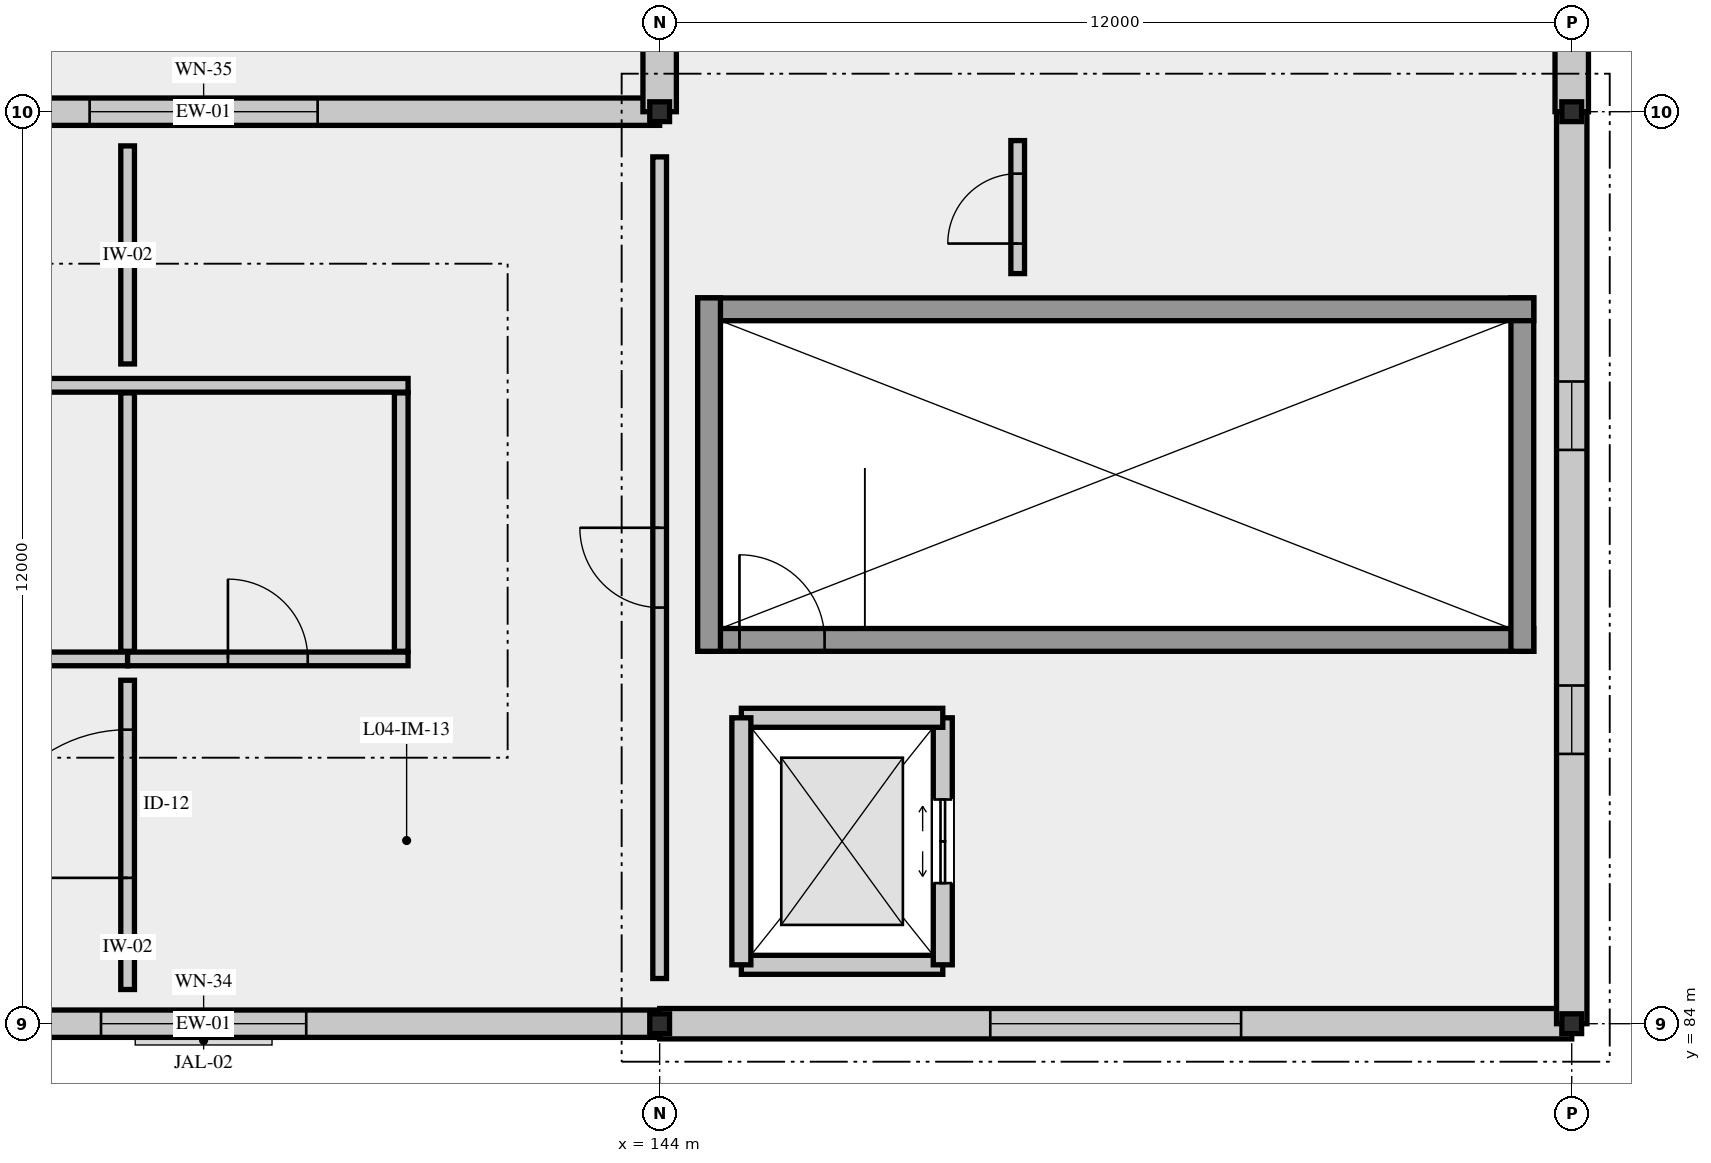
"""IFC4 building model, lengths in metres.
Left out: names, types, materials, properties, quantities, classifications, styles, units other than length and angle.
Written with IfcOpenShell. Run it as: python <this file> out.ifc"""

import sys

from ifc_helpers import new_model, si_unit, direction, frame, frame_2d, origin, origin_2d, place, context, subcontext, project, spatial, rectangle, i_section, extrude, element, fill, save


model = new_model("IFC4")
c1 = context("Model", 3, precision=1e-05, world=origin(), true_north=direction((0.0, 1.0)))
c2 = subcontext(c1, "Body", "Model", "MODEL_VIEW")
j1 = project(units=[si_unit("LENGTHUNIT", "METRE"), si_unit("PLANEANGLEUNIT", "RADIAN")], contexts=[c1])
p1 = place(None, origin())
s1 = spatial("IfcSite", under=j1, at=p1, CompositionType="ELEMENT")
p2 = place(p1, origin())
s2 = spatial("IfcBuilding", under=s1, at=p2, CompositionType="ELEMENT")
p3 = place(p2, frame((0.0, 0.0, 23.4)))
s3 = spatial("IfcBuildingStorey", under=s2, at=p3, CompositionType="ELEMENT", Elevation=23.4)
for number, where, z_axis, x_axis in (
    (1, (144.0, 84.0, 0.0), (0.0, 0.0, 1.0), (1.0, 0.0, 0.0)),
    (2, (144.0, 96.0, 0.0), (0.0, 0.0, 1.0), (1.0, 0.0, 0.0)),
    (3, (156.0, 84.0, 0.0), (0.0, 0.0, 1.0), (1.0, 0.0, 0.0)),
    (4, (156.0, 96.0, 0.0), (0.0, 0.0, 1.0), (1.0, 0.0, 0.0)),
):
    element("IfcColumn", number, at=place(p3, frame(where, z_axis=z_axis, x_axis=x_axis)), inside=s3, PredefinedType="COLUMN", context=c2, shape_type="SweptSolid", body=[
        extrude(i_section(OverallWidth=0.26, OverallDepth=0.26, WebThickness=0.01, FlangeThickness=0.018, FilletRadius=0.024, at=origin_2d()), origin(), (0.0, 0.0, 1.0), 4.8),
    ])
p4 = place(p3, frame((132.0, 84.0, 0.0), z_axis=(0.0, 0.0, 1.0), x_axis=(1.0, 0.0, 0.0)))
e5 = element("IfcWall", 5, at=p4, inside=s3, PredefinedType="SOLIDWALL", context=c2, shape_type="SweptSolid", body=[
    extrude(rectangle(XDim=12.0, YDim=0.36, at=frame_2d((6.0, 0.0))), origin(), (0.0, 0.0, 1.0), 3.98),
])
p5 = place(p4, frame((4.65, 0.0, 0.95)))
e6 = element("IfcOpeningElement", 6, at=p5, cuts=e5, PredefinedType="OPENING", context=c2, shape_type="SweptSolid", body=[
    extrude(rectangle(XDim=2.7, YDim=2.1, at=frame_2d((1.35, 1.05))), frame((0.0, 0.19, 0.0), z_axis=(0.0, -1.0, 0.0), x_axis=(1.0, 0.0, 0.0)), (0.0, 0.0, 1.0), 0.38),
])
p6 = place(p3, frame((144.0, 96.0, 0.0), z_axis=(0.0, 0.0, 1.0), x_axis=(-1.0, 0.0, 0.0)))
e7 = element("IfcWall", 7, at=p6, inside=s3, PredefinedType="SOLIDWALL", context=c2, shape_type="SweptSolid", body=[
    extrude(rectangle(XDim=12.0, YDim=0.36, at=frame_2d((6.0, 0.0))), origin(), (0.0, 0.0, 1.0), 3.98),
])
p7 = place(p6, frame((4.5, 0.0, 0.95)))
e8 = element("IfcOpeningElement", 8, at=p7, cuts=e7, PredefinedType="OPENING", context=c2, shape_type="SweptSolid", body=[
    extrude(rectangle(XDim=3.0, YDim=2.1, at=frame_2d((1.5, 1.05))), frame((0.0, 0.19, 0.0), z_axis=(0.0, -1.0, 0.0), x_axis=(1.0, 0.0, 0.0)), (0.0, 0.0, 1.0), 0.38),
])
p8 = place(p3, frame((144.0, 84.0, 0.0), z_axis=(0.0, 0.0, 1.0), x_axis=(1.0, 0.0, 0.0)))
e9 = element("IfcWall", 9, at=p8, inside=s3, PredefinedType="SOLIDWALL", context=c2, shape_type="SweptSolid", body=[
    extrude(rectangle(XDim=12.0, YDim=0.4, at=frame_2d((6.0, 0.0))), origin(), (0.0, 0.0, 1.0), 3.98),
])
p9 = place(p8, frame((4.35, 0.0, 0.95)))
e10 = element("IfcOpeningElement", 10, at=p9, cuts=e9, PredefinedType="OPENING", context=c2, shape_type="SweptSolid", body=[
    extrude(rectangle(XDim=3.3, YDim=2.1, at=frame_2d((1.65, 1.05))), frame((0.0, 0.21, 0.0), z_axis=(0.0, -1.0, 0.0), x_axis=(1.0, 0.0, 0.0)), (0.0, 0.0, 1.0), 0.42),
])
p10 = place(p3, frame((156.0, 84.0, 0.0), z_axis=(0.0, 0.0, 1.0), x_axis=(0.0, 1.0, 0.0)))
e11 = element("IfcWall", 11, at=p10, inside=s3, PredefinedType="SOLIDWALL", context=c2, shape_type="SweptSolid", body=[
    extrude(rectangle(XDim=12.0, YDim=0.4, at=frame_2d((6.0, 0.0))), origin(), (0.0, 0.0, 1.0), 3.98),
])
p11 = place(p10, frame((3.55, 0.0, 0.95)))
e12 = element("IfcOpeningElement", 12, at=p11, cuts=e11, PredefinedType="OPENING", context=c2, shape_type="SweptSolid", body=[
    extrude(rectangle(XDim=0.9, YDim=2.4, at=frame_2d((0.45, 1.2))), frame((0.0, 0.21, 0.0), z_axis=(0.0, -1.0, 0.0), x_axis=(1.0, 0.0, 0.0)), (0.0, 0.0, 1.0), 0.42),
])
p12 = place(p10, frame((7.55, 0.0, 0.95)))
e13 = element("IfcOpeningElement", 13, at=p12, cuts=e11, PredefinedType="OPENING", context=c2, shape_type="SweptSolid", body=[
    extrude(rectangle(XDim=0.9, YDim=2.4, at=frame_2d((0.45, 1.2))), frame((0.0, 0.21, 0.0), z_axis=(0.0, -1.0, 0.0), x_axis=(1.0, 0.0, 0.0)), (0.0, 0.0, 1.0), 0.42),
])
p13 = place(p3, frame((144.0, 108.0, 0.0), z_axis=(0.0, 0.0, 1.0), x_axis=(0.0, -1.0, 0.0)))
e14 = element("IfcWall", 14, at=p13, inside=s3, PredefinedType="SOLIDWALL", context=c2, shape_type="SweptSolid", body=[
    extrude(rectangle(XDim=12.0, YDim=0.44, at=frame_2d((6.0, 0.0))), origin(), (0.0, 0.0, 1.0), 3.98),
])
p14 = place(p13, frame((3.4, 0.0, 0.95)))
e15 = element("IfcOpeningElement", 15, at=p14, cuts=e14, PredefinedType="OPENING", context=c2, shape_type="SweptSolid", body=[
    extrude(rectangle(XDim=1.2, YDim=2.4, at=frame_2d((0.6, 1.2))), frame((0.0, 0.23, 0.0), z_axis=(0.0, -1.0, 0.0), x_axis=(1.0, 0.0, 0.0)), (0.0, 0.0, 1.0), 0.46),
])
p15 = place(p13, frame((7.4, 0.0, 0.95)))
e16 = element("IfcOpeningElement", 16, at=p15, cuts=e14, PredefinedType="OPENING", context=c2, shape_type="SweptSolid", body=[
    extrude(rectangle(XDim=1.2, YDim=2.4, at=frame_2d((0.6, 1.2))), frame((0.0, 0.23, 0.0), z_axis=(0.0, -1.0, 0.0), x_axis=(1.0, 0.0, 0.0)), (0.0, 0.0, 1.0), 0.46),
])
p16 = place(p3, frame((156.0, 96.0, 0.0), z_axis=(0.0, 0.0, 1.0), x_axis=(0.0, 1.0, 0.0)))
e17 = element("IfcWall", 17, at=p16, inside=s3, PredefinedType="SOLIDWALL", context=c2, shape_type="SweptSolid", body=[
    extrude(rectangle(XDim=12.0, YDim=0.44, at=frame_2d((6.0, 0.0))), origin(), (0.0, 0.0, 1.0), 3.98),
])
p17 = place(p16, frame((3.325, 0.0, 0.95)))
e18 = element("IfcOpeningElement", 18, at=p17, cuts=e17, PredefinedType="OPENING", context=c2, shape_type="SweptSolid", body=[
    extrude(rectangle(XDim=1.35, YDim=2.4, at=frame_2d((0.675, 1.2))), frame((0.0, 0.23, 0.0), z_axis=(0.0, -1.0, 0.0), x_axis=(1.0, 0.0, 0.0)), (0.0, 0.0, 1.0), 0.46),
])
p18 = place(p16, frame((7.325, 0.0, 0.95)))
e19 = element("IfcOpeningElement", 19, at=p18, cuts=e17, PredefinedType="OPENING", context=c2, shape_type="SweptSolid", body=[
    extrude(rectangle(XDim=1.35, YDim=2.4, at=frame_2d((0.675, 1.2))), frame((0.0, 0.23, 0.0), z_axis=(0.0, -1.0, 0.0), x_axis=(1.0, 0.0, 0.0)), (0.0, 0.0, 1.0), 0.46),
])
p19 = place(p3, frame((144.5, 89.05, 0.0), z_axis=(0.0, 0.0, 1.0), x_axis=(1.0, 0.0, 0.0)))
e20 = element("IfcWall", 20, at=p19, inside=s3, PredefinedType="SHEAR", context=c2, shape_type="SweptSolid", body=[
    extrude(rectangle(XDim=11.0, YDim=0.3, at=frame_2d((5.5, 0.0))), origin(), (0.0, 0.0, 1.0), 4.56),
])
p20 = place(p19, frame((0.55, 0.0, 0.0)))
e21 = element("IfcOpeningElement", 21, at=p20, cuts=e20, PredefinedType="OPENING", context=c2, shape_type="SweptSolid", body=[
    extrude(rectangle(XDim=1.12, YDim=2.2, at=frame_2d((0.56, 1.1))), frame((0.0, 0.16, 0.0), z_axis=(0.0, -1.0, 0.0), x_axis=(1.0, 0.0, 0.0)), (0.0, 0.0, 1.0), 0.32),
])
p21 = place(p3, frame((155.35, 88.9, 0.0), z_axis=(0.0, 0.0, 1.0), x_axis=(0.0, 1.0, 0.0)))
e22 = element("IfcWall", 22, at=p21, inside=s3, PredefinedType="SHEAR", context=c2, shape_type="SweptSolid", body=[
    extrude(rectangle(XDim=4.65, YDim=0.3, at=frame_2d((2.325, 0.0))), origin(), (0.0, 0.0, 1.0), 4.56),
])
p22 = place(p3, frame((155.5, 93.4, 0.0), z_axis=(0.0, 0.0, 1.0), x_axis=(-1.0, 0.0, 0.0)))
e23 = element("IfcWall", 23, at=p22, inside=s3, PredefinedType="SHEAR", context=c2, shape_type="SweptSolid", body=[
    extrude(rectangle(XDim=11.0, YDim=0.3, at=frame_2d((5.5, 0.0))), origin(), (0.0, 0.0, 1.0), 4.56),
])
p23 = place(p3, frame((144.65, 93.55, 0.0), z_axis=(0.0, 0.0, 1.0), x_axis=(0.0, -1.0, 0.0)))
e24 = element("IfcWall", 24, at=p23, inside=s3, PredefinedType="SHEAR", context=c2, shape_type="SweptSolid", body=[
    extrude(rectangle(XDim=4.65, YDim=0.3, at=frame_2d((2.325, 0.0))), origin(), (0.0, 0.0, 1.0), 4.56),
])
p24 = place(p3, frame((145.075, 84.775, 0.0), z_axis=(0.0, 0.0, 1.0), x_axis=(1.0, 0.0, 0.0)))
e25 = element("IfcWall", 25, at=p24, inside=s3, PredefinedType="SOLIDWALL", context=c2, shape_type="SweptSolid", body=[
    extrude(rectangle(XDim=2.65, YDim=0.25, at=frame_2d((1.325, 0.0))), origin(), (0.0, 0.0, 1.0), 4.54),
])
p25 = place(p3, frame((147.725, 84.775, 0.0), z_axis=(0.0, 0.0, 1.0), x_axis=(0.0, 1.0, 0.0)))
e26 = element("IfcWall", 26, at=p25, inside=s3, PredefinedType="SOLIDWALL", context=c2, shape_type="SweptSolid", body=[
    extrude(rectangle(XDim=3.25, YDim=0.25, at=frame_2d((1.625, 0.0))), origin(), (0.0, 0.0, 1.0), 4.54),
])
p26 = place(p25, frame((1.075, 0.0, 0.0)))
e27 = element("IfcOpeningElement", 27, at=p26, cuts=e26, PredefinedType="OPENING", context=c2, shape_type="SweptSolid", body=[
    extrude(rectangle(XDim=1.1, YDim=2.2, at=frame_2d((0.55, 1.1))), frame((0.0, 0.135, 0.0), z_axis=(0.0, -1.0, 0.0), x_axis=(1.0, 0.0, 0.0)), (0.0, 0.0, 1.0), 0.27),
])
p27 = place(p3, frame((147.725, 88.025, 0.0), z_axis=(0.0, 0.0, 1.0), x_axis=(-1.0, 0.0, 0.0)))
e28 = element("IfcWall", 28, at=p27, inside=s3, PredefinedType="SOLIDWALL", context=c2, shape_type="SweptSolid", body=[
    extrude(rectangle(XDim=2.65, YDim=0.25, at=frame_2d((1.325, 0.0))), origin(), (0.0, 0.0, 1.0), 4.54),
])
p28 = place(p3, frame((145.075, 88.025, 0.0), z_axis=(0.0, 0.0, 1.0), x_axis=(0.0, -1.0, 0.0)))
e29 = element("IfcWall", 29, at=p28, inside=s3, PredefinedType="SOLIDWALL", context=c2, shape_type="SweptSolid", body=[
    extrude(rectangle(XDim=3.25, YDim=0.25, at=frame_2d((1.625, 0.0))), origin(), (0.0, 0.0, 1.0), 4.54),
])
p29 = place(p3, frame((133.31, 92.4, 0.0), z_axis=(0.0, 0.0, 1.0), x_axis=(1.0, 0.0, 0.0)))
e30 = element("IfcWall", 30, at=p29, inside=s3, PredefinedType="PARTITIONING", context=c2, shape_type="SweptSolid", body=[
    extrude(rectangle(XDim=7.38, YDim=0.18, at=frame_2d((3.69, 0.0))), origin(), (0.0, 0.0, 1.0), 4.14),
])
p30 = place(p3, frame((133.31, 88.8, 0.0), z_axis=(0.0, 0.0, 1.0), x_axis=(1.0, 0.0, 0.0)))
e31 = element("IfcWall", 31, at=p30, inside=s3, PredefinedType="PARTITIONING", context=c2, shape_type="SweptSolid", body=[
    extrude(rectangle(XDim=3.69, YDim=0.18, at=frame_2d((1.845, 0.0))), origin(), (0.0, 0.0, 1.0), 4.14),
])
p31 = place(p30, frame((1.365, 0.0, 0.0)))
e32 = element("IfcOpeningElement", 32, at=p31, cuts=e31, PredefinedType="OPENING", context=c2, shape_type="SweptSolid", body=[
    extrude(rectangle(XDim=0.96, YDim=2.15, at=frame_2d((0.48, 1.075))), frame((0.0, 0.1, 0.0), z_axis=(0.0, -1.0, 0.0), x_axis=(1.0, 0.0, 0.0)), (0.0, 0.0, 1.0), 0.2),
])
p32 = place(p3, frame((137.0, 88.8, 0.0), z_axis=(0.0, 0.0, 1.0), x_axis=(1.0, 0.0, 0.0)))
e33 = element("IfcWall", 33, at=p32, inside=s3, PredefinedType="PARTITIONING", context=c2, shape_type="SweptSolid", body=[
    extrude(rectangle(XDim=3.69, YDim=0.18, at=frame_2d((1.845, 0.0))), origin(), (0.0, 0.0, 1.0), 4.14),
])
p33 = place(p32, frame((1.32, 0.0, 0.0)))
e34 = element("IfcOpeningElement", 34, at=p33, cuts=e33, PredefinedType="OPENING", context=c2, shape_type="SweptSolid", body=[
    extrude(rectangle(XDim=1.05, YDim=2.2, at=frame_2d((0.525, 1.1))), frame((0.0, 0.1, 0.0), z_axis=(0.0, -1.0, 0.0), x_axis=(1.0, 0.0, 0.0)), (0.0, 0.0, 1.0), 0.2),
])
for number, where, z_axis, x_axis in (
    (35, (140.6, 88.9, 0.0), (0.0, 0.0, 1.0), (0.0, 1.0, 0.0)),
    (36, (137.0, 88.9, 0.0), (0.0, 0.0, 1.0), (0.0, 1.0, 0.0)),
):
    element("IfcWall", number, at=place(p3, frame(where, z_axis=z_axis, x_axis=x_axis)), inside=s3, PredefinedType="PARTITIONING", context=c2, shape_type="SweptSolid", body=[
        extrude(rectangle(XDim=3.4, YDim=0.18, at=frame_2d((1.7, 0.0))), origin(), (0.0, 0.0, 1.0), 4.14),
    ])
p34 = place(p3, frame((137.0, 84.45, 0.0), z_axis=(0.0, 0.0, 1.0), x_axis=(0.0, 1.0, 0.0)))
e37 = element("IfcWall", 37, at=p34, inside=s3, PredefinedType="PARTITIONING", context=c2, shape_type="SweptSolid", body=[
    extrude(rectangle(XDim=4.069, YDim=0.18, at=frame_2d((2.035, 0.0))), origin(), (0.0, 0.0, 1.0), 4.14),
])
p35 = place(p34, frame((1.469, 0.0, 0.0)))
e38 = element("IfcOpeningElement", 38, at=p35, cuts=e37, PredefinedType="OPENING", context=c2, shape_type="SweptSolid", body=[
    extrude(rectangle(XDim=1.95, YDim=2.45, at=frame_2d((0.975, 1.225))), frame((0.0, 0.1, 0.0), z_axis=(0.0, -1.0, 0.0), x_axis=(1.0, 0.0, 0.0)), (0.0, 0.0, 1.0), 0.2),
])
p36 = place(p3, frame((137.0, 92.681, 0.0), z_axis=(0.0, 0.0, 1.0), x_axis=(0.0, 1.0, 0.0)))
e39 = element("IfcWall", 39, at=p36, inside=s3, PredefinedType="PARTITIONING", context=c2, shape_type="SweptSolid", body=[
    extrude(rectangle(XDim=2.869, YDim=0.18, at=frame_2d((1.435, 0.0))), origin(), (0.0, 0.0, 1.0), 4.14),
])
p37 = place(p3, frame((144.0, 84.594, 0.0), z_axis=(0.0, 0.0, 1.0), x_axis=(0.0, 1.0, 0.0)))
e40 = element("IfcWall", 40, at=p37, inside=s3, PredefinedType="PARTITIONING", context=c2, shape_type="SweptSolid", body=[
    extrude(rectangle(XDim=10.811, YDim=0.18, at=frame_2d((5.406, 0.0))), origin(), (0.0, 0.0, 1.0), 4.15),
])
p38 = place(p37, frame((4.881, 0.0, 0.0)))
e41 = element("IfcOpeningElement", 41, at=p38, cuts=e40, PredefinedType="OPENING", context=c2, shape_type="SweptSolid", body=[
    extrude(rectangle(XDim=1.05, YDim=2.2, at=frame_2d((0.525, 1.1))), frame((0.0, 0.1, 0.0), z_axis=(0.0, -1.0, 0.0), x_axis=(1.0, 0.0, 0.0)), (0.0, 0.0, 1.0), 0.2),
])
p39 = place(p3, frame((148.711, 93.87, 0.0), z_axis=(0.0, 0.0, 1.0), x_axis=(0.0, 1.0, 0.0)))
e42 = element("IfcWall", 42, at=p39, inside=s3, PredefinedType="PARTITIONING", context=c2, shape_type="SweptSolid", body=[
    extrude(rectangle(XDim=1.75, YDim=0.18, at=frame_2d((0.875, 0.0))), origin(), (0.0, 0.0, 1.0), 4.54),
])
p40 = place(p39, frame((0.395, 0.0, 0.0)))
e43 = element("IfcOpeningElement", 43, at=p40, cuts=e42, PredefinedType="OPENING", context=c2, shape_type="SweptSolid", body=[
    extrude(rectangle(XDim=0.92, YDim=2.15, at=frame_2d((0.46, 1.075))), frame((0.0, 0.1, 0.0), z_axis=(0.0, -1.0, 0.0), x_axis=(1.0, 0.0, 0.0)), (0.0, 0.0, 1.0), 0.2),
])
p41 = place(p5, origin())
e44 = element("IfcWindow", 44, at=p41, inside=s3, PartitioningType="SINGLE_PANEL", PredefinedType="WINDOW", context=c2, shape_type="SweptSolid", body=[
    extrude(rectangle(XDim=2.7, YDim=2.1, at=frame_2d((1.35, 1.05))), frame((0.0, 0.03, 0.0), z_axis=(0.0, -1.0, 0.0), x_axis=(1.0, 0.0, 0.0)), (0.0, 0.0, 1.0), 0.06),
])
fill(e6, e44)
p42 = place(p7, origin())
e45 = element("IfcWindow", 45, at=p42, inside=s3, PartitioningType="SINGLE_PANEL", PredefinedType="WINDOW", context=c2, shape_type="SweptSolid", body=[
    extrude(rectangle(XDim=3.0, YDim=2.1, at=frame_2d((1.5, 1.05))), frame((0.0, 0.03, 0.0), z_axis=(0.0, -1.0, 0.0), x_axis=(1.0, 0.0, 0.0)), (0.0, 0.0, 1.0), 0.06),
])
fill(e8, e45)
p43 = place(p9, origin())
e46 = element("IfcWindow", 46, at=p43, inside=s3, PartitioningType="SINGLE_PANEL", PredefinedType="WINDOW", context=c2, shape_type="SweptSolid", body=[
    extrude(rectangle(XDim=3.3, YDim=2.1, at=frame_2d((1.65, 1.05))), frame((0.0, 0.03, 0.0), z_axis=(0.0, -1.0, 0.0), x_axis=(1.0, 0.0, 0.0)), (0.0, 0.0, 1.0), 0.06),
])
fill(e10, e46)
p44 = place(p11, origin())
e47 = element("IfcWindow", 47, at=p44, inside=s3, PartitioningType="SINGLE_PANEL", PredefinedType="WINDOW", context=c2, shape_type="SweptSolid", body=[
    extrude(rectangle(XDim=0.9, YDim=2.4, at=frame_2d((0.45, 1.2))), frame((0.0, 0.03, 0.0), z_axis=(0.0, -1.0, 0.0), x_axis=(1.0, 0.0, 0.0)), (0.0, 0.0, 1.0), 0.06),
])
fill(e12, e47)
p45 = place(p12, origin())
e48 = element("IfcWindow", 48, at=p45, inside=s3, PartitioningType="SINGLE_PANEL", PredefinedType="WINDOW", context=c2, shape_type="SweptSolid", body=[
    extrude(rectangle(XDim=0.9, YDim=2.4, at=frame_2d((0.45, 1.2))), frame((0.0, 0.03, 0.0), z_axis=(0.0, -1.0, 0.0), x_axis=(1.0, 0.0, 0.0)), (0.0, 0.0, 1.0), 0.06),
])
fill(e13, e48)
p46 = place(p20, origin())
e49 = element("IfcDoor", 49, at=p46, inside=s3, OperationType="SINGLE_SWING_LEFT", PredefinedType="DOOR", context=c2, shape_type="SweptSolid", body=[
    extrude(rectangle(XDim=1.12, YDim=2.2, at=frame_2d((0.56, 1.1))), frame((0.0, 0.025, 0.0), z_axis=(0.0, -1.0, 0.0), x_axis=(1.0, 0.0, 0.0)), (0.0, 0.0, 1.0), 0.05),
])
fill(e21, e49)
p47 = place(p26, origin())
e50 = element("IfcDoor", 50, at=p47, inside=s3, OperationType="SLIDING_TO_LEFT", PredefinedType="DOOR", context=c2, shape_type="SweptSolid", body=[
    extrude(rectangle(XDim=1.1, YDim=2.2, at=frame_2d((0.55, 1.1))), frame((0.0, 0.025, 0.0), z_axis=(0.0, -1.0, 0.0), x_axis=(1.0, 0.0, 0.0)), (0.0, 0.0, 1.0), 0.05),
])
fill(e27, e50)
p48 = place(p33, origin())
e51 = element("IfcDoor", 51, at=p48, inside=s3, OperationType="SINGLE_SWING_LEFT", PredefinedType="DOOR", context=c2, shape_type="SweptSolid", body=[
    extrude(rectangle(XDim=1.05, YDim=2.2, at=frame_2d((0.525, 1.1))), frame((0.0, 0.025, 0.0), z_axis=(0.0, -1.0, 0.0), x_axis=(1.0, 0.0, 0.0)), (0.0, 0.0, 1.0), 0.05),
])
fill(e34, e51)
p49 = place(p35, origin())
e52 = element("IfcDoor", 52, at=p49, inside=s3, OperationType="DOUBLE_DOOR_SINGLE_SWING", PredefinedType="DOOR", context=c2, shape_type="SweptSolid", body=[
    extrude(rectangle(XDim=1.95, YDim=2.45, at=frame_2d((0.975, 1.225))), frame((0.0, 0.025, 0.0), z_axis=(0.0, -1.0, 0.0), x_axis=(1.0, 0.0, 0.0)), (0.0, 0.0, 1.0), 0.05),
])
fill(e38, e52)
p50 = place(p38, origin())
e53 = element("IfcDoor", 53, at=p50, inside=s3, OperationType="SINGLE_SWING_RIGHT", PredefinedType="DOOR", context=c2, shape_type="SweptSolid", body=[
    extrude(rectangle(XDim=1.05, YDim=2.2, at=frame_2d((0.525, 1.1))), frame((0.0, 0.025, 0.0), z_axis=(0.0, -1.0, 0.0), x_axis=(1.0, 0.0, 0.0)), (0.0, 0.0, 1.0), 0.05),
])
fill(e41, e53)
p51 = place(p40, origin())
e54 = element("IfcDoor", 54, at=p51, inside=s3, OperationType="SINGLE_SWING_LEFT", PredefinedType="DOOR", context=c2, shape_type="SweptSolid", body=[
    extrude(rectangle(XDim=0.92, YDim=2.15, at=frame_2d((0.46, 1.075))), frame((0.0, 0.025, 0.0), z_axis=(0.0, -1.0, 0.0), x_axis=(1.0, 0.0, 0.0)), (0.0, 0.0, 1.0), 0.05),
])
fill(e43, e54)
save(model, sys.argv[1])
